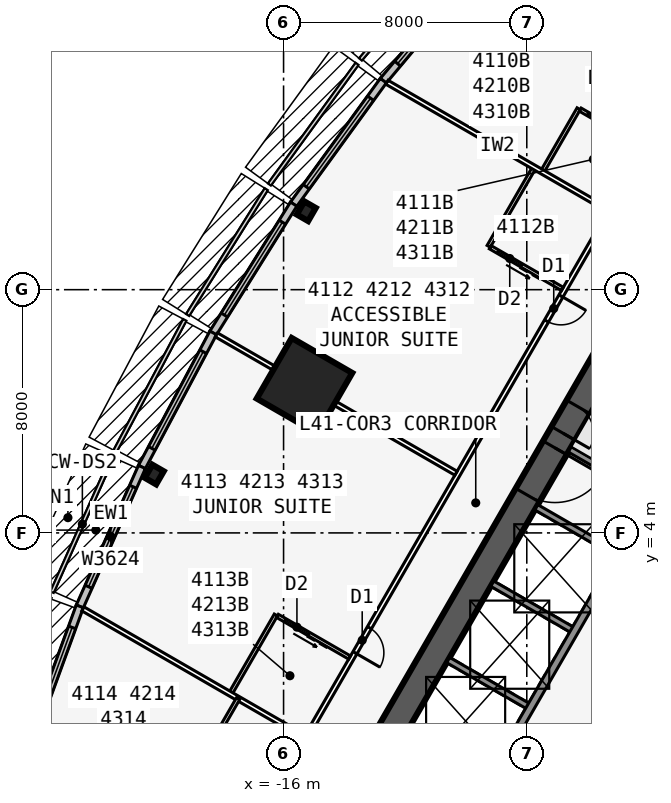
"""IFC4 building model, lengths in metres.
Left out: names, types, materials, properties, quantities, classifications, styles, units other than length and angle.
Written with IfcOpenShell. Run it as: python <this file> out.ifc"""

import sys

from ifc_helpers import new_model, si_unit, direction, frame, frame_2d, origin, origin_2d, place, context, subcontext, project, spatial, rectangle, i_section, extrude, element, fill, save


model = new_model("IFC4")
c1 = context("Model", 3, precision=1e-05, world=origin(), true_north=direction((0.0, 1.0)))
c2 = subcontext(c1, "Body", "Model", "MODEL_VIEW")
j1 = project(units=[si_unit("LENGTHUNIT", "METRE"), si_unit("PLANEANGLEUNIT", "RADIAN")], contexts=[c1])
p1 = place(None, origin())
s1 = spatial("IfcSite", under=j1, at=p1, CompositionType="ELEMENT")
p2 = place(p1, origin())
s2 = spatial("IfcBuilding", under=s1, at=p2, CompositionType="ELEMENT")
p3 = place(p2, frame((0.0, 0.0, 155.5)))
s3 = spatial("IfcBuildingStorey", under=s2, at=p3, CompositionType="ELEMENT", Elevation=155.5)
p4 = place(p3, frame((0.0, 19.052, 0.0), z_axis=(0.0, 0.0, 1.0), x_axis=(-0.499999749417, -0.866025548458, 0.0)))
e1 = element("IfcWall", 1, at=p4, inside=s3, PredefinedType="SHEAR", context=c2, shape_type="SweptSolid", body=[
    extrude(rectangle(XDim=33.0, YDim=0.9, at=frame_2d((16.5, 0.0))), origin(), (0.0, 0.0, 1.0), 3.4),
])
p5 = place(p4, frame((14.15, 0.0, 0.0)))
e2 = element("IfcOpeningElement", 2, at=p5, cuts=e1, PredefinedType="OPENING", context=c2, shape_type="SweptSolid", body=[
    extrude(rectangle(XDim=1.8, YDim=2.13, at=frame_2d((0.9, 1.065))), frame((0.0, 0.46, 0.0), z_axis=(0.0, -1.0, 0.0), x_axis=(1.0, 0.0, 0.0)), (0.0, 0.0, 1.0), 0.92),
])
p6 = place(p4, frame((12.6, 0.0, 0.0)))
e3 = element("IfcOpeningElement", 3, at=p6, cuts=e1, PredefinedType="OPENING", context=c2, shape_type="SweptSolid", body=[
    extrude(rectangle(XDim=1.0, YDim=2.13, at=frame_2d((0.5, 1.065))), frame((0.0, 0.46, 0.0), z_axis=(0.0, -1.0, 0.0), x_axis=(1.0, 0.0, 0.0)), (0.0, 0.0, 1.0), 0.92),
])
p7 = place(p3, frame((-4.929, 3.365, 0.0), z_axis=(0.0, 0.0, 1.0), x_axis=(-0.499991433582, -0.866030349552, 0.0)))
e4 = element("IfcWall", 4, at=p7, inside=s3, PredefinedType="SOLIDWALL", context=c2, shape_type="SweptSolid", body=[
    extrude(rectangle(XDim=10.633, YDim=0.25, at=frame_2d((5.316, 0.0))), origin(), (0.0, 0.0, 1.0), 3.235),
])
p8 = place(p7, frame((9.164, 0.0, 0.0)))
e5 = element("IfcOpeningElement", 5, at=p8, cuts=e4, PredefinedType="OPENING", context=c2, shape_type="SweptSolid", body=[
    extrude(rectangle(XDim=0.9, YDim=2.13, at=frame_2d((0.45, 1.065))), frame((0.0, 0.135, 0.0), z_axis=(0.0, -1.0, 0.0), x_axis=(1.0, 0.0, 0.0)), (0.0, 0.0, 1.0), 0.27),
])
for number, where, z_axis, x_axis in (
    (6, (-3.879, 5.184, 0.0), (0.0, 0.0, 1.0), (-0.866, 0.5, 0.0)),
    (7, (-4.979, 3.279, 0.0), (0.0, 0.0, 1.0), (-0.866, 0.5, 0.0)),
    (8, (-6.429, 0.767, 0.0), (0.0, 0.0, 1.0), (-0.866, 0.5, 0.0)),
    (9, (-7.879, -1.744, 0.0), (0.0, 0.0, 1.0), (-0.866, 0.5, 0.0)),
):
    element("IfcWall", number, at=place(p3, frame(where, z_axis=z_axis, x_axis=x_axis)), inside=s3, PredefinedType="SOLIDWALL", context=c2, shape_type="SweptSolid", body=[
        extrude(rectangle(XDim=3.125, YDim=0.2, at=frame_2d((1.562, 0.0))), origin(), (0.0, 0.0, 1.0), 3.235),
    ])
for number, where, z_axis, x_axis in (
    (10, (-15.254, 14.58, 0.0), (0.0, 0.0, 1.0), (-0.866, 0.5, 0.0)),
    (11, (-20.254, 5.92, 0.0), (0.0, 0.0, 1.0), (-0.866, 0.5, 0.0)),
):
    element("IfcColumn", number, at=place(p3, frame(where, z_axis=z_axis, x_axis=x_axis)), inside=s3, PredefinedType="COLUMN", context=c2, shape_type="SweptSolid", body=[
        extrude(i_section(OverallWidth=0.432, OverallDepth=0.498, WebThickness=0.056, FlangeThickness=0.089, at=origin_2d()), origin(), (0.0, 0.0, 1.0), 3.4),
    ])
p9 = place(p3, frame((-15.312, 8.84, 0.0), z_axis=(0.0, 0.0, 1.0), x_axis=(-0.866025403784, 0.5, 0.0)))
e12 = element("IfcColumn", 12, at=p9, inside=s3, PredefinedType="COLUMN", context=c2, shape_type="SweptSolid", body=[
    extrude(rectangle(XDim=2.3, YDim=2.3, at=origin_2d()), origin(), (0.0, 0.0, 1.0), 3.4),
])
p10 = place(p3, frame((-9.465, 22.76, 0.0), z_axis=(0.0, 0.0, 1.0), x_axis=(-0.641810386606, -0.766863369607, 0.0)))
e13 = element("IfcWall", 13, at=p10, inside=s3, PredefinedType="STANDARD", context=c2, shape_type="SweptSolid", body=[
    extrude(rectangle(XDim=5.076, YDim=0.25, at=frame_2d((2.538, 0.0))), origin(), (0.0, 0.0, 1.0), 3.235),
])
p11 = place(p10, frame((0.738, 0.0, 0.45)))
e14 = element("IfcOpeningElement", 14, at=p11, cuts=e13, PredefinedType="OPENING", context=c2, shape_type="SweptSolid", body=[
    extrude(rectangle(XDim=3.6, YDim=2.4, at=frame_2d((1.8, 1.2))), frame((0.0, 0.135, 0.0), z_axis=(0.0, -1.0, 0.0), x_axis=(1.0, 0.0, 0.0)), (0.0, 0.0, 1.0), 0.27),
])
p12 = place(p3, frame((-12.718, 18.875, 0.0), z_axis=(0.0, 0.0, 1.0), x_axis=(-0.587669188412, -0.809101307001, 0.0)))
e15 = element("IfcWall", 15, at=p12, inside=s3, PredefinedType="STANDARD", context=c2, shape_type="SweptSolid", body=[
    extrude(rectangle(XDim=5.028, YDim=0.25, at=frame_2d((2.514, 0.0))), origin(), (0.0, 0.0, 1.0), 3.235),
])
p13 = place(p12, frame((0.714, 0.0, 0.45)))
e16 = element("IfcOpeningElement", 16, at=p13, cuts=e15, PredefinedType="OPENING", context=c2, shape_type="SweptSolid", body=[
    extrude(rectangle(XDim=3.6, YDim=2.4, at=frame_2d((1.8, 1.2))), frame((0.0, 0.135, 0.0), z_axis=(0.0, -1.0, 0.0), x_axis=(1.0, 0.0, 0.0)), (0.0, 0.0, 1.0), 0.27),
])
p14 = place(p3, frame((-15.667, 14.814, 0.0), z_axis=(0.0, 0.0, 1.0), x_axis=(-0.529990167382, -0.84800378683, 0.0)))
e17 = element("IfcWall", 17, at=p14, inside=s3, PredefinedType="STANDARD", context=c2, shape_type="SweptSolid", body=[
    extrude(rectangle(XDim=5.003, YDim=0.25, at=frame_2d((2.501, 0.0))), origin(), (0.0, 0.0, 1.0), 3.235),
])
p15 = place(p14, frame((0.701, 0.0, 0.45)))
e18 = element("IfcOpeningElement", 18, at=p15, cuts=e17, PredefinedType="OPENING", context=c2, shape_type="SweptSolid", body=[
    extrude(rectangle(XDim=3.6, YDim=2.4, at=frame_2d((1.8, 1.2))), frame((0.0, 0.135, 0.0), z_axis=(0.0, -1.0, 0.0), x_axis=(1.0, 0.0, 0.0)), (0.0, 0.0, 1.0), 0.27),
])
p16 = place(p3, frame((-18.314, 10.579, 0.0), z_axis=(0.0, 0.0, 1.0), x_axis=(-0.469404966864, -0.882982999317, 0.0)))
e19 = element("IfcWall", 19, at=p16, inside=s3, PredefinedType="STANDARD", context=c2, shape_type="SweptSolid", body=[
    extrude(rectangle(XDim=5.003, YDim=0.25, at=frame_2d((2.501, 0.0))), origin(), (0.0, 0.0, 1.0), 3.235),
])
p17 = place(p16, frame((0.701, 0.0, 0.45)))
e20 = element("IfcOpeningElement", 20, at=p17, cuts=e19, PredefinedType="OPENING", context=c2, shape_type="SweptSolid", body=[
    extrude(rectangle(XDim=3.6, YDim=2.4, at=frame_2d((1.8, 1.2))), frame((0.0, 0.135, 0.0), z_axis=(0.0, -1.0, 0.0), x_axis=(1.0, 0.0, 0.0)), (0.0, 0.0, 1.0), 0.27),
])
p18 = place(p3, frame((-20.659, 6.169, 0.0), z_axis=(0.0, 0.0, 1.0), x_axis=(-0.406832200364, -0.913502906808, 0.0)))
e21 = element("IfcWall", 21, at=p18, inside=s3, PredefinedType="STANDARD", context=c2, shape_type="SweptSolid", body=[
    extrude(rectangle(XDim=5.028, YDim=0.25, at=frame_2d((2.514, 0.0))), origin(), (0.0, 0.0, 1.0), 3.235),
])
p19 = place(p18, frame((0.714, 0.0, 0.45)))
e22 = element("IfcOpeningElement", 22, at=p19, cuts=e21, PredefinedType="OPENING", context=c2, shape_type="SweptSolid", body=[
    extrude(rectangle(XDim=3.6, YDim=2.4, at=frame_2d((1.8, 1.2))), frame((0.0, 0.135, 0.0), z_axis=(0.0, -1.0, 0.0), x_axis=(1.0, 0.0, 0.0)), (0.0, 0.0, 1.0), 0.27),
])
p20 = place(p3, frame((-22.701, 1.584, 0.0), z_axis=(0.0, 0.0, 1.0), x_axis=(-0.343225593282, -0.939252996863, 0.0)))
e23 = element("IfcWall", 23, at=p20, inside=s3, PredefinedType="STANDARD", context=c2, shape_type="SweptSolid", body=[
    extrude(rectangle(XDim=5.076, YDim=0.25, at=frame_2d((2.538, 0.0))), origin(), (0.0, 0.0, 1.0), 3.235),
])
p21 = place(p20, frame((0.738, 0.0, 0.45)))
e24 = element("IfcOpeningElement", 24, at=p21, cuts=e23, PredefinedType="OPENING", context=c2, shape_type="SweptSolid", body=[
    extrude(rectangle(XDim=3.6, YDim=2.4, at=frame_2d((1.8, 1.2))), frame((0.0, 0.135, 0.0), z_axis=(0.0, -1.0, 0.0), x_axis=(1.0, 0.0, 0.0)), (0.0, 0.0, 1.0), 0.27),
])
p22 = place(p3, frame((-0.5, 22.836, 0.0), z_axis=(0.0, 0.0, 1.0), x_axis=(-0.500001677587, -0.866024435227, 0.0)))
e25 = element("IfcWall", 25, at=p22, inside=s3, PredefinedType="PARTITIONING", context=c2, shape_type="SweptSolid", body=[
    extrude(rectangle(XDim=39.054, YDim=0.15, at=frame_2d((19.527, 0.0))), origin(), (0.0, 0.0, 1.0), 3.235),
])
p23 = place(p22, frame((0.352, 0.0, 0.0)))
e26 = element("IfcOpeningElement", 26, at=p23, cuts=e25, PredefinedType="OPENING", context=c2, shape_type="SweptSolid", body=[
    extrude(rectangle(XDim=0.95, YDim=2.13, at=frame_2d((0.475, 1.065))), frame((0.0, 0.085, 0.0), z_axis=(0.0, -1.0, 0.0), x_axis=(1.0, 0.0, 0.0)), (0.0, 0.0, 1.0), 0.17),
])
p24 = place(p22, frame((5.952, 0.0, 0.0)))
e27 = element("IfcOpeningElement", 27, at=p24, cuts=e25, PredefinedType="OPENING", context=c2, shape_type="SweptSolid", body=[
    extrude(rectangle(XDim=0.95, YDim=2.13, at=frame_2d((0.475, 1.065))), frame((0.0, 0.085, 0.0), z_axis=(0.0, -1.0, 0.0), x_axis=(1.0, 0.0, 0.0)), (0.0, 0.0, 1.0), 0.17),
])
p25 = place(p22, frame((12.752, 0.0, 0.0)))
e28 = element("IfcOpeningElement", 28, at=p25, cuts=e25, PredefinedType="OPENING", context=c2, shape_type="SweptSolid", body=[
    extrude(rectangle(XDim=0.95, YDim=2.13, at=frame_2d((0.475, 1.065))), frame((0.0, 0.085, 0.0), z_axis=(0.0, -1.0, 0.0), x_axis=(1.0, 0.0, 0.0)), (0.0, 0.0, 1.0), 0.17),
])
p26 = place(p22, frame((25.352, 0.0, 0.0)))
e29 = element("IfcOpeningElement", 29, at=p26, cuts=e25, PredefinedType="OPENING", context=c2, shape_type="SweptSolid", body=[
    extrude(rectangle(XDim=0.95, YDim=2.13, at=frame_2d((0.475, 1.065))), frame((0.0, 0.085, 0.0), z_axis=(0.0, -1.0, 0.0), x_axis=(1.0, 0.0, 0.0)), (0.0, 0.0, 1.0), 0.17),
])
p27 = place(p22, frame((32.152, 0.0, 0.0)))
e30 = element("IfcOpeningElement", 30, at=p27, cuts=e25, PredefinedType="OPENING", context=c2, shape_type="SweptSolid", body=[
    extrude(rectangle(XDim=0.95, YDim=2.13, at=frame_2d((0.475, 1.065))), frame((0.0, 0.085, 0.0), z_axis=(0.0, -1.0, 0.0), x_axis=(1.0, 0.0, 0.0)), (0.0, 0.0, 1.0), 0.17),
])
p28 = place(p22, frame((37.752, 0.0, 0.0)))
e31 = element("IfcOpeningElement", 31, at=p28, cuts=e25, PredefinedType="OPENING", context=c2, shape_type="SweptSolid", body=[
    extrude(rectangle(XDim=0.95, YDim=2.13, at=frame_2d((0.475, 1.065))), frame((0.0, 0.085, 0.0), z_axis=(0.0, -1.0, 0.0), x_axis=(1.0, 0.0, 0.0)), (0.0, 0.0, 1.0), 0.17),
])
p29 = place(p3, frame((-2.829, 18.954, 0.0), z_axis=(0.0, 0.0, 1.0), x_axis=(-0.866015739374, 0.500016738876, 0.0)))
e32 = element("IfcWall", 32, at=p29, inside=s3, PredefinedType="PARTITIONING", context=c2, shape_type="SweptSolid", body=[
    extrude(rectangle(XDim=7.516, YDim=0.15, at=frame_2d((3.758, 0.0))), origin(), (0.0, 0.0, 1.0), 2.389),
])
p30 = place(p3, frame((-5.329, 14.623, 0.0), z_axis=(0.0, 0.0, 1.0), x_axis=(-0.866011723728, 0.500023693804, 0.0)))
e33 = element("IfcWall", 33, at=p30, inside=s3, PredefinedType="PARTITIONING", context=c2, shape_type="SweptSolid", body=[
    extrude(rectangle(XDim=8.395, YDim=0.15, at=frame_2d((4.198, 0.0))), origin(), (0.0, 0.0, 1.0), 2.389),
])
p31 = place(p3, frame((-10.329, 5.963, 0.0), z_axis=(0.0, 0.0, 1.0), x_axis=(-0.866025170687, 0.500000403736, 0.0)))
e34 = element("IfcWall", 34, at=p31, inside=s3, PredefinedType="PARTITIONING", context=c2, shape_type="SweptSolid", body=[
    extrude(rectangle(XDim=9.099, YDim=0.15, at=frame_2d((4.549, 0.0))), origin(), (0.0, 0.0, 1.0), 2.389),
])
p32 = place(p3, frame((-15.329, -2.697, 0.0), z_axis=(0.0, 0.0, 1.0), x_axis=(-0.866024316602, 0.50000188305, 0.0)))
e35 = element("IfcWall", 35, at=p32, inside=s3, PredefinedType="PARTITIONING", context=c2, shape_type="SweptSolid", body=[
    extrude(rectangle(XDim=8.395, YDim=0.15, at=frame_2d((4.198, 0.0))), origin(), (0.0, 0.0, 1.0), 2.389),
])
p33 = place(p3, frame((-6.293, 17.952, 0.0), z_axis=(0.0, 0.0, 1.0), x_axis=(-0.499957262057, -0.866050077142, 0.0)))
e36 = element("IfcWall", 36, at=p33, inside=s3, PredefinedType="PLUMBINGWALL", context=c2, shape_type="SweptSolid", body=[
    extrude(rectangle(XDim=2.4, YDim=0.12, at=frame_2d((1.2, 0.0))), origin(), (0.0, 0.0, 1.0), 3.235),
])
p34 = place(p3, frame((-4.128, 16.702, 0.0), z_axis=(0.0, 0.0, 1.0), x_axis=(-0.866048967903, 0.499959183527, 0.0)))
e37 = element("IfcWall", 37, at=p34, inside=s3, PredefinedType="PLUMBINGWALL", context=c2, shape_type="SweptSolid", body=[
    extrude(rectangle(XDim=2.44, YDim=0.12, at=frame_2d((1.22, 0.0))), origin(), (0.0, 0.0, 1.0), 3.235),
])
p35 = place(p34, frame((1.25, 0.0, 0.0)))
e38 = element("IfcOpeningElement", 38, at=p35, cuts=e37, PredefinedType="OPENING", context=c2, shape_type="SweptSolid", body=[
    extrude(rectangle(XDim=0.9, YDim=2.13, at=frame_2d((0.45, 1.065))), frame((0.0, 0.07, 0.0), z_axis=(0.0, -1.0, 0.0), x_axis=(1.0, 0.0, 0.0)), (0.0, 0.0, 1.0), 0.14),
])
p36 = place(p3, frame((-7.753, 16.023, 0.0), z_axis=(0.0, 0.0, 1.0), x_axis=(-0.499990139034, -0.866031096941, 0.0)))
e39 = element("IfcWall", 39, at=p36, inside=s3, PredefinedType="PLUMBINGWALL", context=c2, shape_type="SweptSolid", body=[
    extrude(rectangle(XDim=3.0, YDim=0.12, at=frame_2d((1.5, 0.0))), origin(), (0.0, 0.0, 1.0), 3.235),
])
p37 = place(p3, frame((-6.829, 12.025, 0.0), z_axis=(0.0, 0.0, 1.0), x_axis=(-0.866035715982, 0.499982138324, 0.0)))
e40 = element("IfcWall", 40, at=p37, inside=s3, PredefinedType="PLUMBINGWALL", context=c2, shape_type="SweptSolid", body=[
    extrude(rectangle(XDim=2.74, YDim=0.12, at=frame_2d((1.37, 0.0))), origin(), (0.0, 0.0, 1.0), 3.235),
])
p38 = place(p37, frame((1.55, 0.0, 0.0)))
e41 = element("IfcOpeningElement", 41, at=p38, cuts=e40, PredefinedType="OPENING", context=c2, shape_type="SweptSolid", body=[
    extrude(rectangle(XDim=0.9, YDim=2.13, at=frame_2d((0.45, 1.065))), frame((0.0, 0.07, 0.0), z_axis=(0.0, -1.0, 0.0), x_axis=(1.0, 0.0, 0.0)), (0.0, 0.0, 1.0), 0.14),
])
p39 = place(p3, frame((-16.253, 1.301, 0.0), z_axis=(0.0, 0.0, 1.0), x_axis=(-0.499990139034, -0.866031096941, 0.0)))
e42 = element("IfcWall", 42, at=p39, inside=s3, PredefinedType="PLUMBINGWALL", context=c2, shape_type="SweptSolid", body=[
    extrude(rectangle(XDim=3.0, YDim=0.12, at=frame_2d((1.5, 0.0))), origin(), (0.0, 0.0, 1.0), 3.235),
])
p40 = place(p3, frame((-13.829, -0.099, 0.0), z_axis=(0.0, 0.0, 1.0), x_axis=(-0.865997131366, 0.500048966069, 0.0)))
e43 = element("IfcWall", 43, at=p40, inside=s3, PredefinedType="PLUMBINGWALL", context=c2, shape_type="SweptSolid", body=[
    extrude(rectangle(XDim=2.74, YDim=0.12, at=frame_2d((1.37, 0.0))), origin(), (0.0, 0.0, 1.0), 3.235),
])
p41 = place(p40, frame((1.55, 0.0, 0.0)))
e44 = element("IfcOpeningElement", 44, at=p41, cuts=e43, PredefinedType="OPENING", context=c2, shape_type="SweptSolid", body=[
    extrude(rectangle(XDim=0.9, YDim=2.13, at=frame_2d((0.45, 1.065))), frame((0.0, 0.07, 0.0), z_axis=(0.0, -1.0, 0.0), x_axis=(1.0, 0.0, 0.0)), (0.0, 0.0, 1.0), 0.14),
])
p42 = place(p3, frame((-17.493, -1.447, 0.0), z_axis=(0.0, 0.0, 1.0), x_axis=(-0.500033551112, -0.866006032174, 0.0)))
e45 = element("IfcWall", 45, at=p42, inside=s3, PredefinedType="PLUMBINGWALL", context=c2, shape_type="SweptSolid", body=[
    extrude(rectangle(XDim=2.4, YDim=0.12, at=frame_2d((1.2, 0.0))), origin(), (0.0, 0.0, 1.0), 3.235),
])
p43 = place(p11, origin())
e46 = element("IfcWindow", 46, at=p43, inside=s3, PartitioningType="SINGLE_PANEL", PredefinedType="WINDOW", context=c2, shape_type="SweptSolid", body=[
    extrude(rectangle(XDim=3.6, YDim=2.4, at=frame_2d((1.8, 1.2))), frame((0.0, 0.03, 0.0), z_axis=(0.0, -1.0, 0.0), x_axis=(1.0, 0.0, 0.0)), (0.0, 0.0, 1.0), 0.06),
])
fill(e14, e46)
p44 = place(p13, origin())
e47 = element("IfcWindow", 47, at=p44, inside=s3, PartitioningType="SINGLE_PANEL", PredefinedType="WINDOW", context=c2, shape_type="SweptSolid", body=[
    extrude(rectangle(XDim=3.6, YDim=2.4, at=frame_2d((1.8, 1.2))), frame((0.0, 0.03, 0.0), z_axis=(0.0, -1.0, 0.0), x_axis=(1.0, 0.0, 0.0)), (0.0, 0.0, 1.0), 0.06),
])
fill(e16, e47)
p45 = place(p15, origin())
e48 = element("IfcWindow", 48, at=p45, inside=s3, PartitioningType="SINGLE_PANEL", PredefinedType="WINDOW", context=c2, shape_type="SweptSolid", body=[
    extrude(rectangle(XDim=3.6, YDim=2.4, at=frame_2d((1.8, 1.2))), frame((0.0, 0.03, 0.0), z_axis=(0.0, -1.0, 0.0), x_axis=(1.0, 0.0, 0.0)), (0.0, 0.0, 1.0), 0.06),
])
fill(e18, e48)
p46 = place(p17, origin())
e49 = element("IfcWindow", 49, at=p46, inside=s3, PartitioningType="SINGLE_PANEL", PredefinedType="WINDOW", context=c2, shape_type="SweptSolid", body=[
    extrude(rectangle(XDim=3.6, YDim=2.4, at=frame_2d((1.8, 1.2))), frame((0.0, 0.03, 0.0), z_axis=(0.0, -1.0, 0.0), x_axis=(1.0, 0.0, 0.0)), (0.0, 0.0, 1.0), 0.06),
])
fill(e20, e49)
p47 = place(p19, origin())
e50 = element("IfcWindow", 50, at=p47, inside=s3, PartitioningType="SINGLE_PANEL", PredefinedType="WINDOW", context=c2, shape_type="SweptSolid", body=[
    extrude(rectangle(XDim=3.6, YDim=2.4, at=frame_2d((1.8, 1.2))), frame((0.0, 0.03, 0.0), z_axis=(0.0, -1.0, 0.0), x_axis=(1.0, 0.0, 0.0)), (0.0, 0.0, 1.0), 0.06),
])
fill(e22, e50)
p48 = place(p21, origin())
e51 = element("IfcWindow", 51, at=p48, inside=s3, PartitioningType="SINGLE_PANEL", PredefinedType="WINDOW", context=c2, shape_type="SweptSolid", body=[
    extrude(rectangle(XDim=3.6, YDim=2.4, at=frame_2d((1.8, 1.2))), frame((0.0, 0.03, 0.0), z_axis=(0.0, -1.0, 0.0), x_axis=(1.0, 0.0, 0.0)), (0.0, 0.0, 1.0), 0.06),
])
fill(e24, e51)
p49 = place(p35, origin())
e52 = element("IfcDoor", 52, at=p49, inside=s3, OperationType="SLIDING_TO_LEFT", PredefinedType="DOOR", context=c2, shape_type="SweptSolid", body=[
    extrude(rectangle(XDim=0.9, YDim=2.13, at=frame_2d((0.45, 1.065))), frame((0.0, 0.025, 0.0), z_axis=(0.0, -1.0, 0.0), x_axis=(1.0, 0.0, 0.0)), (0.0, 0.0, 1.0), 0.05),
])
fill(e38, e52)
p50 = place(p38, origin())
e53 = element("IfcDoor", 53, at=p50, inside=s3, OperationType="SLIDING_TO_LEFT", PredefinedType="DOOR", context=c2, shape_type="SweptSolid", body=[
    extrude(rectangle(XDim=0.9, YDim=2.13, at=frame_2d((0.45, 1.065))), frame((0.0, 0.025, 0.0), z_axis=(0.0, -1.0, 0.0), x_axis=(1.0, 0.0, 0.0)), (0.0, 0.0, 1.0), 0.05),
])
fill(e41, e53)
p51 = place(p25, origin())
e54 = element("IfcDoor", 54, at=p51, inside=s3, OperationType="SINGLE_SWING_LEFT", PredefinedType="DOOR", context=c2, shape_type="SweptSolid", body=[
    extrude(rectangle(XDim=0.95, YDim=2.13, at=frame_2d((0.475, 1.065))), frame((0.0, 0.025, 0.0), z_axis=(0.0, -1.0, 0.0), x_axis=(1.0, 0.0, 0.0)), (0.0, 0.0, 1.0), 0.05),
])
fill(e28, e54)
p52 = place(p41, origin())
e55 = element("IfcDoor", 55, at=p52, inside=s3, OperationType="SLIDING_TO_LEFT", PredefinedType="DOOR", context=c2, shape_type="SweptSolid", body=[
    extrude(rectangle(XDim=0.9, YDim=2.13, at=frame_2d((0.45, 1.065))), frame((0.0, 0.025, 0.0), z_axis=(0.0, -1.0, 0.0), x_axis=(1.0, 0.0, 0.0)), (0.0, 0.0, 1.0), 0.05),
])
fill(e44, e55)
p53 = place(p26, origin())
e56 = element("IfcDoor", 56, at=p53, inside=s3, OperationType="SINGLE_SWING_RIGHT", PredefinedType="DOOR", context=c2, shape_type="SweptSolid", body=[
    extrude(rectangle(XDim=0.95, YDim=2.13, at=frame_2d((0.475, 1.065))), frame((0.0, 0.025, 0.0), z_axis=(0.0, -1.0, 0.0), x_axis=(1.0, 0.0, 0.0)), (0.0, 0.0, 1.0), 0.05),
])
fill(e29, e56)
p54 = place(p5, origin())
e57 = element("IfcDoor", 57, at=p54, inside=s3, OperationType="DOUBLE_DOOR_SINGLE_SWING", PredefinedType="DOOR", context=c2, shape_type="SweptSolid", body=[
    extrude(rectangle(XDim=1.8, YDim=2.13, at=frame_2d((0.9, 1.065))), frame((0.0, 0.025, 0.0), z_axis=(0.0, -1.0, 0.0), x_axis=(1.0, 0.0, 0.0)), (0.0, 0.0, 1.0), 0.05),
])
fill(e2, e57)
p55 = place(p6, origin())
e58 = element("IfcDoor", 58, at=p55, inside=s3, OperationType="SINGLE_SWING_RIGHT", PredefinedType="DOOR", context=c2, shape_type="SweptSolid", body=[
    extrude(rectangle(XDim=1.0, YDim=2.13, at=frame_2d((0.5, 1.065))), frame((0.0, 0.025, 0.0), z_axis=(0.0, -1.0, 0.0), x_axis=(1.0, 0.0, 0.0)), (0.0, 0.0, 1.0), 0.05),
])
fill(e3, e58)
save(model, sys.argv[1])
